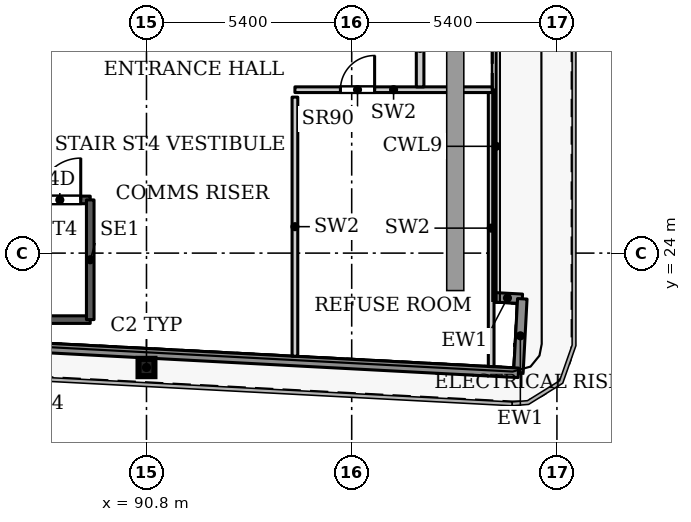
"""IFC4 building model, lengths in metres.
Left out: names, types, materials, properties, quantities, classifications, styles, units other than length and angle.
Written with IfcOpenShell. Run it as: python <this file> out.ifc"""

import sys

from ifc_helpers import new_model, si_unit, direction, frame, frame_2d, origin, origin_2d, place, context, subcontext, project, spatial, rectangle, i_section, extrude, source, transform, mapped, element, fill, save


model = new_model("IFC4")
c1 = context("Model", 3, precision=1e-05, world=origin(), true_north=direction((0.0, 1.0)))
c2 = subcontext(c1, "Body", "Model", "MODEL_VIEW")
j1 = project(units=[si_unit("LENGTHUNIT", "METRE"), si_unit("PLANEANGLEUNIT", "RADIAN")], contexts=[c1])
p1 = place(None, origin())
s1 = spatial("IfcSite", under=j1, at=p1, CompositionType="ELEMENT")
p2 = place(p1, origin())
s2 = spatial("IfcBuilding", under=s1, at=p2, CompositionType="ELEMENT")
p3 = place(p2, frame((0.0, 0.0, 94.1)))
s3 = spatial("IfcBuildingStorey", under=s2, at=p3, CompositionType="ELEMENT", Elevation=94.1)
p4 = place(p3, frame((90.8, 20.99, 0.0), z_axis=(0.0, 0.0, 1.0), x_axis=(1.0, 0.0, 0.0)))
e1 = element("IfcColumn", 1, at=p4, inside=s3, PredefinedType="COLUMN", context=c2, shape_type="SweptSolid", body=[
    extrude(i_section(OverallWidth=0.418, OverallDepth=0.455, WebThickness=0.042, FlangeThickness=0.068, FilletRadius=0.014, at=origin_2d()), origin(), (0.0, 0.0, 1.0), 3.9),
])
p5 = place(p3, frame((99.907, 22.839, 0.0), z_axis=(0.0, 0.0, 1.0), x_axis=(0.998561284263, -0.053622398031, 0.0)))
e2 = element("IfcWall", 2, at=p5, inside=s3, PredefinedType="SOLIDWALL", context=c2, shape_type="SweptSolid", body=[
    extrude(rectangle(XDim=0.783, YDim=0.25, at=frame_2d((0.392, 0.0))), origin(), (0.0, 0.0, 1.0), 3.75),
])
p6 = place(p3, frame((100.689, 22.797, 0.0), z_axis=(0.0, 0.0, 1.0), x_axis=(-0.052841433274, -0.998602915542, 0.0)))
e3 = element("IfcWall", 3, at=p6, inside=s3, PredefinedType="SOLIDWALL", context=c2, shape_type="SweptSolid", body=[
    extrude(rectangle(XDim=1.95, YDim=0.25, at=frame_2d((0.975, 0.0))), origin(), (0.0, 0.0, 1.0), 3.75),
])
p7 = place(p3, frame((100.586, 20.85, 0.0), z_axis=(0.0, 0.0, 1.0), x_axis=(-0.99861746497, 0.052565755559, 0.0)))
e4 = element("IfcWall", 4, at=p7, inside=s3, PredefinedType="SOLIDWALL", context=c2, shape_type="SweptSolid", body=[
    extrude(rectangle(XDim=66.639, YDim=0.25, at=frame_2d((33.319, 0.0))), origin(), (0.0, 0.0, 1.0), 3.75),
])
p8 = place(p3, frame((80.16, 22.25, 0.0), z_axis=(0.0, 0.0, 1.0), x_axis=(1.0, 0.0, 0.0)))
e5 = element("IfcWall", 5, at=p8, inside=s3, PredefinedType="SHEAR", context=c2, shape_type="SweptSolid", body=[
    extrude(rectangle(XDim=9.16, YDim=0.2, at=frame_2d((4.58, 0.0))), origin(), (0.0, 0.0, 1.0), 3.9),
])
p9 = place(p3, frame((80.16, 25.4, 0.0), z_axis=(0.0, 0.0, 1.0), x_axis=(1.0, 0.0, 0.0)))
e6 = element("IfcWall", 6, at=p9, inside=s3, PredefinedType="SHEAR", context=c2, shape_type="SweptSolid", body=[
    extrude(rectangle(XDim=9.16, YDim=0.2, at=frame_2d((4.58, 0.0))), origin(), (0.0, 0.0, 1.0), 3.9),
])
p10 = place(p9, frame((7.81, 0.0, 0.0)))
e7 = element("IfcOpeningElement", 7, at=p10, cuts=e6, PredefinedType="OPENING", context=c2, shape_type="SweptSolid", body=[
    extrude(rectangle(XDim=1.1, YDim=2.2, at=frame_2d((0.55, 1.1))), frame((0.0, 0.11, 0.0), z_axis=(0.0, -1.0, 0.0), x_axis=(1.0, 0.0, 0.0)), (0.0, 0.0, 1.0), 0.22),
])
p11 = place(p3, frame((89.32, 22.25, 0.0), z_axis=(0.0, 0.0, 1.0), x_axis=(0.0, 1.0, 0.0)))
e8 = element("IfcWall", 8, at=p11, inside=s3, PredefinedType="SHEAR", context=c2, shape_type="SweptSolid", body=[
    extrude(rectangle(XDim=3.15, YDim=0.2, at=frame_2d((1.575, 0.0))), origin(), (0.0, 0.0, 1.0), 3.9),
])
p12 = place(p3, frame((99.87, 21.015, 0.0), z_axis=(0.0, 0.0, 1.0), x_axis=(0.0, 1.0, 0.0)))
e9 = element("IfcWall", 9, at=p12, inside=s3, PredefinedType="PARTITIONING", context=c2, shape_type="SweptSolid", body=[
    extrude(rectangle(XDim=7.285, YDim=0.15, at=frame_2d((3.643, 0.0))), origin(), (0.0, 0.0, 1.0), 3.9),
])
p13 = place(p3, frame((94.706, 28.3, 0.0), z_axis=(0.0, 0.0, 1.0), x_axis=(1.0, 0.0, 0.0)))
e10 = element("IfcWall", 10, at=p13, inside=s3, PredefinedType="PARTITIONING", context=c2, shape_type="SweptSolid", body=[
    extrude(rectangle(XDim=5.192, YDim=0.15, at=frame_2d((2.596, 0.0))), origin(), (0.0, 0.0, 1.0), 3.9),
])
p14 = place(p13, frame((1.197, 0.0, 0.0)))
e11 = element("IfcOpeningElement", 11, at=p14, cuts=e10, PredefinedType="OPENING", context=c2, shape_type="SweptSolid", body=[
    extrude(rectangle(XDim=0.9, YDim=2.2, at=frame_2d((0.45, 1.1))), frame((0.0, 0.085, 0.0), z_axis=(0.0, -1.0, 0.0), x_axis=(1.0, 0.0, 0.0)), (0.0, 0.0, 1.0), 0.17),
])
p15 = place(p3, frame((94.706, 21.287, 0.0), z_axis=(0.0, 0.0, 1.0), x_axis=(0.0, 1.0, 0.0)))
e12 = element("IfcWall", 12, at=p15, inside=s3, PredefinedType="PARTITIONING", context=c2, shape_type="SweptSolid", body=[
    extrude(rectangle(XDim=6.818, YDim=0.15, at=frame_2d((3.409, 0.0))), origin(), (0.0, 0.0, 1.0), 3.9),
])
p16 = place(p3, frame((98.0, 28.374, 0.0), z_axis=(0.0, 0.0, 1.0), x_axis=(0.0, 1.0, 0.0)))
e13 = element("IfcWall", 13, at=p16, inside=s3, PredefinedType="PARTITIONING", context=c2, shape_type="SweptSolid", body=[
    extrude(rectangle(XDim=2.026, YDim=0.2, at=frame_2d((1.013, 0.0))), origin(), (0.0, 0.0, 1.0), 3.6),
])
m1 = source(origin(), c2, "Body", "SweptSolid", [
    extrude(rectangle(XDim=0.9, YDim=2.2, at=frame_2d((0.45, 1.1))), frame((0.0, 0.025, 0.0), z_axis=(0.0, -1.0, 0.0), x_axis=(1.0, 0.0, 0.0)), (0.0, 0.0, 1.0), 0.05),
])
p17 = place(p14, origin())
e14 = element("IfcDoor", 14, at=p17, inside=s3, OperationType="SINGLE_SWING_LEFT", PredefinedType="DOOR", context=c2, shape_type="MappedRepresentation", body=[
    mapped(m1, transform((0.0, 0.0, 0.0), x_axis=(1.0, 0.0, 0.0), y_axis=(0.0, 1.0, 0.0), z_axis=(0.0, 0.0, 1.0), scale=1.0)),
])
fill(e11, e14)
m2 = source(origin(), c2, "Body", "SweptSolid", [
    extrude(rectangle(XDim=1.1, YDim=2.2, at=frame_2d((0.55, 1.1))), frame((0.0, 0.025, 0.0), z_axis=(0.0, -1.0, 0.0), x_axis=(1.0, 0.0, 0.0)), (0.0, 0.0, 1.0), 0.05),
])
p18 = place(p10, origin())
e15 = element("IfcDoor", 15, at=p18, inside=s3, OperationType="SINGLE_SWING_LEFT", PredefinedType="DOOR", context=c2, shape_type="MappedRepresentation", body=[
    mapped(m2, transform((0.0, 0.0, 0.0), x_axis=(1.0, 0.0, 0.0), y_axis=(0.0, 1.0, 0.0), z_axis=(0.0, 0.0, 1.0), scale=1.0)),
])
fill(e7, e15)
save(model, sys.argv[1])
